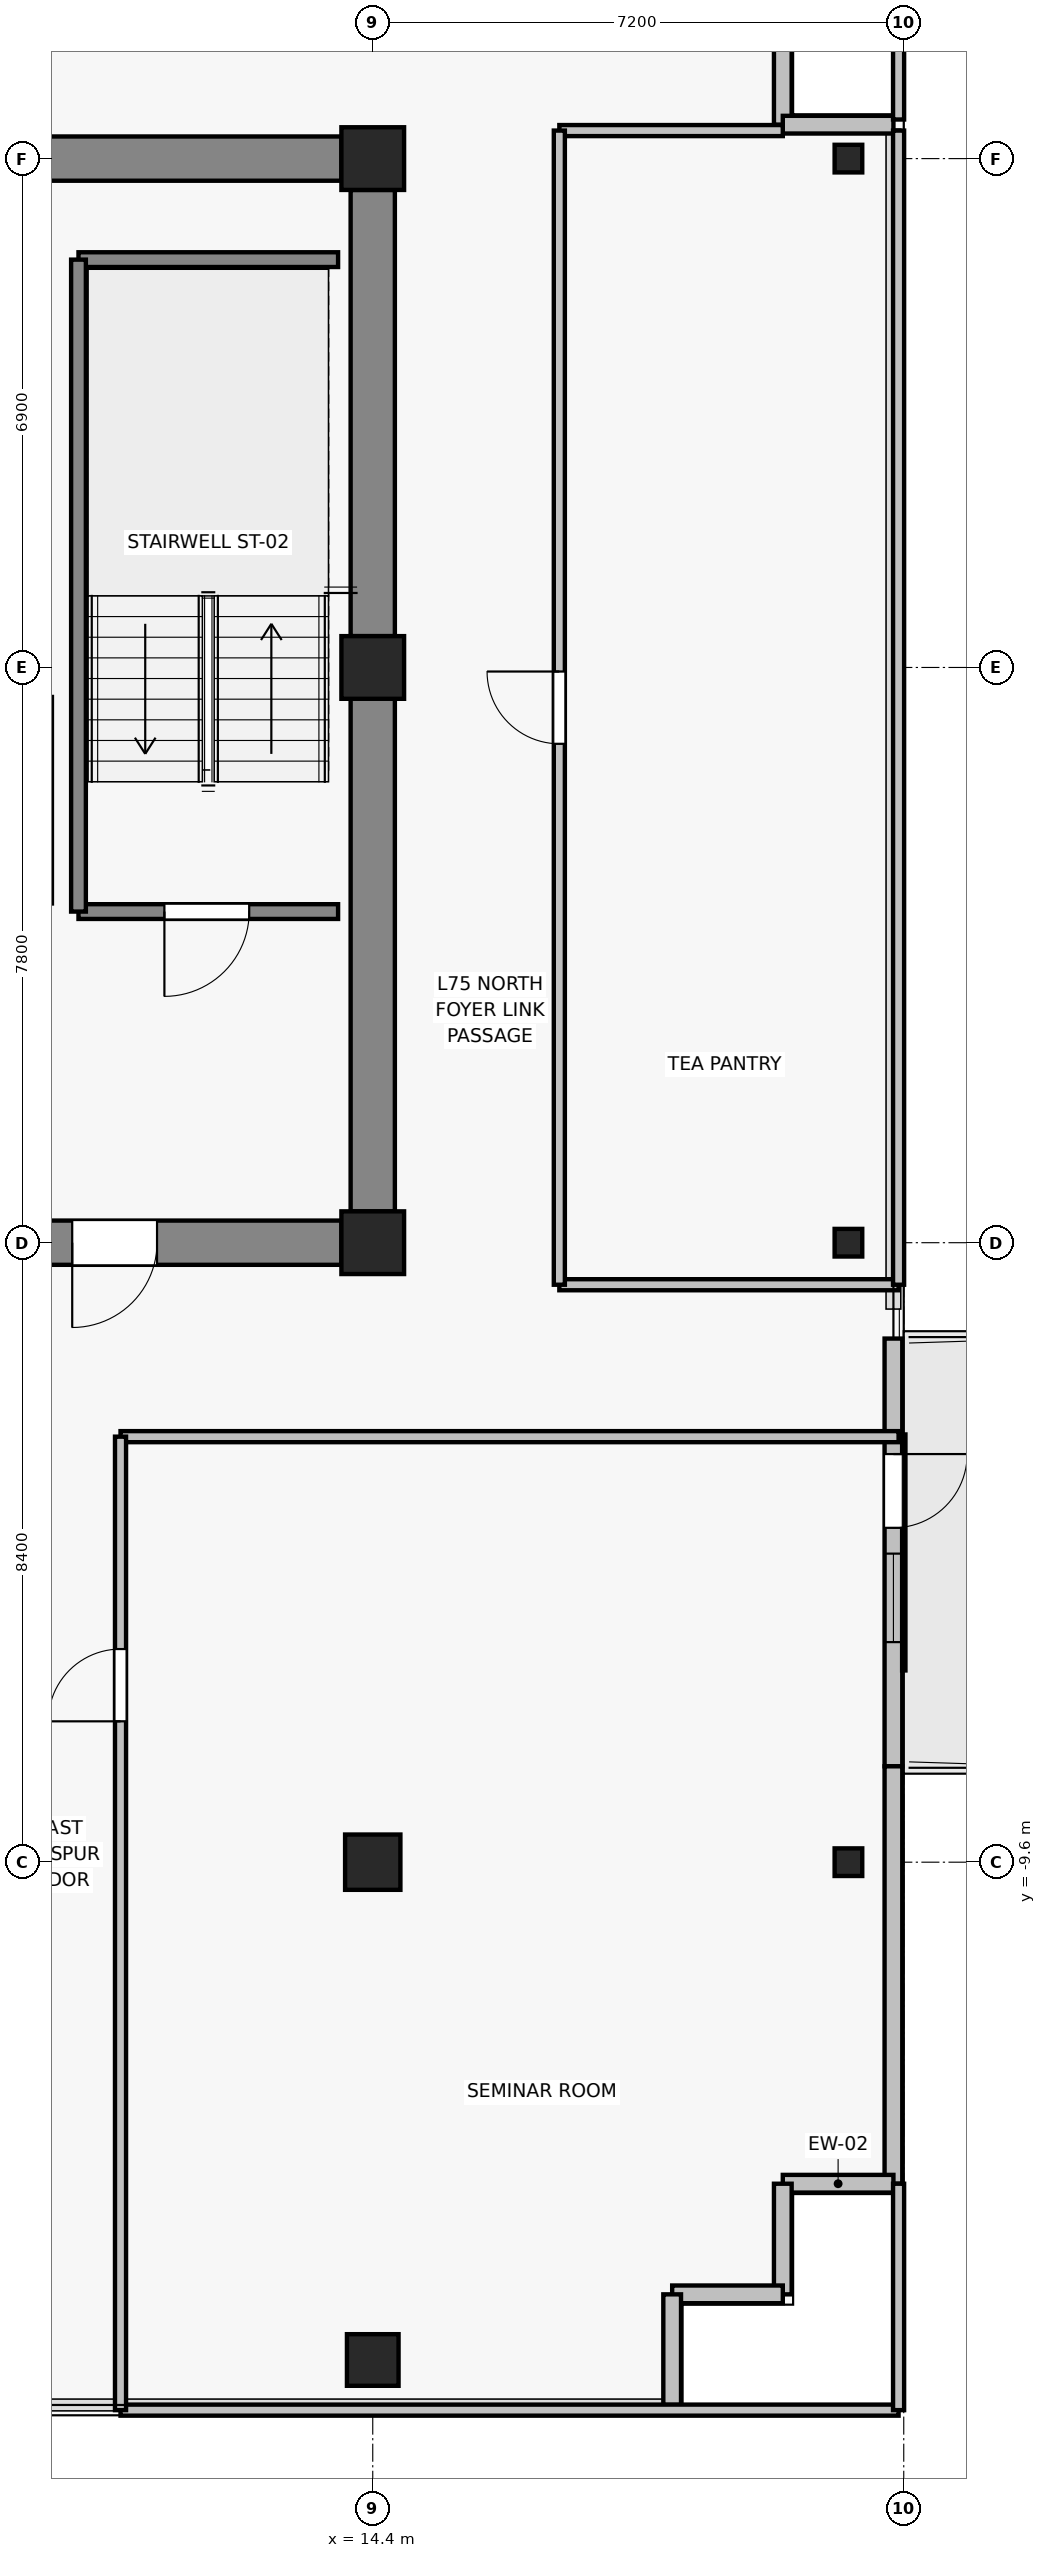
"""IFC4 building model, lengths in metres.
Left out: names, types, materials, properties, quantities, classifications, styles, units other than length and angle.
Written with IfcOpenShell. Run it as: python <this file> out.ifc"""

import sys

from ifc_helpers import new_model, si_unit, direction, frame, frame_2d, origin, origin_2d, place, context, subcontext, project, spatial, rectangle, i_section, extrude, source, transform, mapped, element, fill, save


model = new_model("IFC4")
c1 = context("Model", 3, precision=1e-05, world=origin(), true_north=direction((0.0, 1.0)))
c2 = subcontext(c1, "Body", "Model", "MODEL_VIEW")
j1 = project(units=[si_unit("LENGTHUNIT", "METRE"), si_unit("PLANEANGLEUNIT", "RADIAN")], contexts=[c1])
p1 = place(None, origin())
s1 = spatial("IfcSite", under=j1, at=p1, CompositionType="ELEMENT")
p2 = place(p1, origin())
s2 = spatial("IfcBuilding", under=s1, at=p2, CompositionType="ELEMENT")
p3 = place(p2, frame((0.0, 0.0, 265.0)))
s3 = spatial("IfcBuildingStorey", under=s2, at=p3, CompositionType="ELEMENT", Elevation=265.0)
for number, where, z_axis, x_axis in (
    (1, (14.4, -1.2, 0.0), (0.0, 0.0, 1.0), (1.0, 0.0, 0.0)),
    (2, (14.4, 6.6, 0.0), (0.0, 0.0, 1.0), (1.0, 0.0, 0.0)),
    (3, (14.4, 13.5, 0.0), (0.0, 0.0, 1.0), (1.0, 0.0, 0.0)),
):
    element("IfcColumn", number, at=place(p3, frame(where, z_axis=z_axis, x_axis=x_axis)), inside=s3, PredefinedType="COLUMN", context=c2, shape_type="SweptSolid", body=[
        extrude(rectangle(XDim=0.85, YDim=0.85, at=origin_2d()), origin(), (0.0, 0.0, 1.0), 3.3),
    ])
p4 = place(p3, frame((14.4, -9.6, 0.0), z_axis=(0.0, 0.0, 1.0), x_axis=(1.0, 0.0, 0.0)))
e4 = element("IfcColumn", 4, at=p4, inside=s3, PredefinedType="COLUMN", context=c2, shape_type="SweptSolid", body=[
    extrude(rectangle(XDim=0.75, YDim=0.75, at=origin_2d()), origin(), (0.0, 0.0, 1.0), 3.3),
])
p5 = place(p3, frame((14.4, -16.35, 0.0), z_axis=(0.0, 0.0, 1.0), x_axis=(1.0, 0.0, 0.0)))
e5 = element("IfcColumn", 5, at=p5, inside=s3, PredefinedType="COLUMN", context=c2, shape_type="SweptSolid", body=[
    extrude(rectangle(XDim=0.7, YDim=0.7, at=origin_2d()), origin(), (0.0, 0.0, 1.0), 3.3),
])
for number, where, z_axis, x_axis in (
    (6, (20.85, -9.6, 0.0), (0.0, 0.0, 1.0), (1.0, 0.0, 0.0)),
    (7, (20.85, -1.2, 0.0), (0.0, 0.0, 1.0), (1.0, 0.0, 0.0)),
    (8, (20.85, 13.5, 0.0), (0.0, 0.0, 1.0), (1.0, 0.0, 0.0)),
):
    element("IfcColumn", number, at=place(p3, frame(where, z_axis=z_axis, x_axis=x_axis)), inside=s3, PredefinedType="COLUMN", context=c2, shape_type="SweptSolid", body=[
        extrude(i_section(OverallWidth=0.375, OverallDepth=0.375, WebThickness=0.017, FlangeThickness=0.027, FilletRadius=0.015, at=origin_2d()), origin(), (0.0, 0.0, 1.0), 3.3),
    ])
p6 = place(p3, frame((7.625, 13.5, 0.0), z_axis=(0.0, 0.0, 1.0), x_axis=(1.0, 0.0, 0.0)))
e9 = element("IfcWall", 9, at=p6, inside=s3, PredefinedType="SHEAR", context=c2, shape_type="SweptSolid", body=[
    extrude(rectangle(XDim=6.35, YDim=0.6, at=frame_2d((3.175, 0.0))), origin(), (0.0, 0.0, 1.0), 3.075),
])
p7 = place(p3, frame((14.4, -0.775, 0.0), z_axis=(0.0, 0.0, 1.0), x_axis=(0.0, 1.0, 0.0)))
e10 = element("IfcWall", 10, at=p7, inside=s3, PredefinedType="SHEAR", context=c2, shape_type="SweptSolid", body=[
    extrude(rectangle(XDim=6.95, YDim=0.6, at=frame_2d((3.475, 0.0))), origin(), (0.0, 0.0, 1.0), 3.075),
])
p8 = place(p3, frame((14.4, 7.025, 0.0), z_axis=(0.0, 0.0, 1.0), x_axis=(0.0, 1.0, 0.0)))
e11 = element("IfcWall", 11, at=p8, inside=s3, PredefinedType="SHEAR", context=c2, shape_type="SweptSolid", body=[
    extrude(rectangle(XDim=6.05, YDim=0.6, at=frame_2d((3.025, 0.0))), origin(), (0.0, 0.0, 1.0), 3.075),
])
p9 = place(p3, frame((13.975, -1.2, 0.0), z_axis=(0.0, 0.0, 1.0), x_axis=(-1.0, 0.0, 0.0)))
e12 = element("IfcWall", 12, at=p9, inside=s3, PredefinedType="SHEAR", context=c2, shape_type="SweptSolid", body=[
    extrude(rectangle(XDim=6.35, YDim=0.6, at=frame_2d((3.175, 0.0))), origin(), (0.0, 0.0, 1.0), 3.075),
])
p10 = place(p9, frame((2.5, 0.0, 0.0)))
e13 = element("IfcOpeningElement", 13, at=p10, cuts=e12, PredefinedType="OPENING", context=c2, shape_type="SweptSolid", body=[
    extrude(rectangle(XDim=1.15, YDim=2.15, at=frame_2d((0.575, 1.075))), frame((0.0, 0.31, 0.0), z_axis=(0.0, -1.0, 0.0), x_axis=(1.0, 0.0, 0.0)), (0.0, 0.0, 1.0), 0.62),
])
p11 = place(p3, frame((21.46, -2.5, 0.0), z_axis=(0.0, 0.0, 1.0), x_axis=(0.0, -1.0, 0.0)))
e14 = element("IfcWall", 14, at=p11, inside=s3, PredefinedType="SOLIDWALL", context=c2, shape_type="SweptSolid", body=[
    extrude(rectangle(XDim=5.8, YDim=0.24, at=frame_2d((2.9, 0.0))), origin(), (0.0, 0.0, 1.0), 3.075),
])
p12 = place(p11, frame((1.566, 0.0, 0.0)))
e15 = element("IfcOpeningElement", 15, at=p12, cuts=e14, PredefinedType="OPENING", context=c2, shape_type="SweptSolid", body=[
    extrude(rectangle(XDim=1.0, YDim=2.2, at=frame_2d((0.5, 1.1))), frame((0.0, 0.13, 0.0), z_axis=(0.0, -1.0, 0.0), x_axis=(1.0, 0.0, 0.0)), (0.0, 0.0, 1.0), 0.26),
])
p13 = place(p11, frame((2.916, 0.0, 0.85)))
e16 = element("IfcOpeningElement", 16, at=p13, cuts=e14, PredefinedType="OPENING", context=c2, shape_type="SweptSolid", body=[
    extrude(rectangle(XDim=1.2, YDim=1.5, at=frame_2d((0.6, 0.75))), frame((0.0, 0.13, 0.0), z_axis=(0.0, -1.0, 0.0), x_axis=(1.0, 0.0, 0.0)), (0.0, 0.0, 1.0), 0.26),
])
for number, where, z_axis, x_axis in (
    (17, (19.96, 13.96, 0.0), (0.0, 0.0, 1.0), (0.0, 1.0, 0.0)),
    (18, (21.46, 13.96, 0.0), (0.0, 0.0, 1.0), (-1.0, 0.0, 0.0)),
):
    element("IfcWall", number, at=place(p3, frame(where, z_axis=z_axis, x_axis=x_axis)), inside=s3, PredefinedType="SOLIDWALL", context=c2, shape_type="SweptSolid", body=[
        extrude(rectangle(XDim=1.5, YDim=0.24, at=frame_2d((0.75, 0.0))), origin(), (0.0, 0.0, 1.0), 3.075),
    ])
p14 = place(p3, frame((21.46, -13.96, 0.0), z_axis=(0.0, 0.0, 1.0), x_axis=(0.0, 1.0, 0.0)))
e19 = element("IfcWall", 19, at=p14, inside=s3, PredefinedType="SOLIDWALL", context=c2, shape_type="SweptSolid", body=[
    extrude(rectangle(XDim=5.66, YDim=0.24, at=frame_2d((2.83, 0.0))), origin(), (0.0, 0.0, 1.0), 3.075),
])
for number, where, z_axis, x_axis in (
    (20, (19.96, -13.96, 0.0), (0.0, 0.0, 1.0), (1.0, 0.0, 0.0)),
    (21, (19.96, -15.46, 0.0), (0.0, 0.0, 1.0), (0.0, 1.0, 0.0)),
    (22, (18.46, -15.46, 0.0), (0.0, 0.0, 1.0), (1.0, 0.0, 0.0)),
    (23, (18.46, -16.96, 0.0), (0.0, 0.0, 1.0), (0.0, 1.0, 0.0)),
):
    element("IfcWall", number, at=place(p3, frame(where, z_axis=z_axis, x_axis=x_axis)), inside=s3, PredefinedType="SOLIDWALL", context=c2, shape_type="SweptSolid", body=[
        extrude(rectangle(XDim=1.5, YDim=0.24, at=frame_2d((0.75, 0.0))), origin(), (0.0, 0.0, 1.0), 3.075),
    ])
p15 = place(p3, frame((13.93, 3.29, 0.0), z_axis=(0.0, 0.0, 1.0), x_axis=(-1.0, 0.0, 0.0)))
e24 = element("IfcWall", 24, at=p15, inside=s3, PredefinedType="SOLIDWALL", context=c2, shape_type="SweptSolid", body=[
    extrude(rectangle(XDim=3.52, YDim=0.2, at=frame_2d((1.76, 0.0))), origin(), (0.0, 0.0, 1.0), 3.075),
])
p16 = place(p15, frame((1.205, 0.0, 0.0)))
e25 = element("IfcOpeningElement", 25, at=p16, cuts=e24, PredefinedType="OPENING", context=c2, shape_type="SweptSolid", body=[
    extrude(rectangle(XDim=1.15, YDim=2.15, at=frame_2d((0.575, 1.075))), frame((0.0, 0.11, 0.0), z_axis=(0.0, -1.0, 0.0), x_axis=(1.0, 0.0, 0.0)), (0.0, 0.0, 1.0), 0.22),
])
p17 = place(p3, frame((10.41, 12.13, 0.0), z_axis=(0.0, 0.0, 1.0), x_axis=(1.0, 0.0, 0.0)))
e26 = element("IfcWall", 26, at=p17, inside=s3, PredefinedType="SOLIDWALL", context=c2, shape_type="SweptSolid", body=[
    extrude(rectangle(XDim=3.52, YDim=0.2, at=frame_2d((1.76, 0.0))), origin(), (0.0, 0.0, 1.0), 3.075),
])
p18 = place(p3, frame((10.41, 3.29, 0.0), z_axis=(0.0, 0.0, 1.0), x_axis=(0.0, 1.0, 0.0)))
e27 = element("IfcWall", 27, at=p18, inside=s3, PredefinedType="SOLIDWALL", context=c2, shape_type="SweptSolid", body=[
    extrude(rectangle(XDim=8.84, YDim=0.2, at=frame_2d((4.42, 0.0))), origin(), (0.0, 0.0, 1.0), 3.075),
])
p19 = place(p3, frame((21.53, -17.03, 0.0), z_axis=(0.0, 0.0, 1.0), x_axis=(-1.0, 0.0, 0.0)))
e28 = element("IfcWall", 28, at=p19, inside=s3, PredefinedType="PARTITIONING", context=c2, shape_type="SweptSolid", body=[
    extrude(rectangle(XDim=10.55, YDim=0.15, at=frame_2d((5.275, 0.0))), origin(), (0.0, 0.0, 1.0), 3.075),
])
p20 = place(p3, frame((10.98, -3.83, 0.0), z_axis=(0.0, 0.0, 1.0), x_axis=(1.0, 0.0, 0.0)))
e29 = element("IfcWall", 29, at=p20, inside=s3, PredefinedType="PARTITIONING", context=c2, shape_type="SweptSolid", body=[
    extrude(rectangle(XDim=10.55, YDim=0.15, at=frame_2d((5.275, 0.0))), origin(), (0.0, 0.0, 1.0), 2.615),
])
p21 = place(p3, frame((10.98, -17.03, 0.0), z_axis=(0.0, 0.0, 1.0), x_axis=(0.0, 1.0, 0.0)))
e30 = element("IfcWall", 30, at=p21, inside=s3, PredefinedType="PARTITIONING", context=c2, shape_type="SweptSolid", body=[
    extrude(rectangle(XDim=13.2, YDim=0.15, at=frame_2d((6.6, 0.0))), origin(), (0.0, 0.0, 1.0), 2.615),
])
p22 = place(p21, frame((9.34, 0.0, 0.0)))
e31 = element("IfcOpeningElement", 31, at=p22, cuts=e30, PredefinedType="OPENING", context=c2, shape_type="SweptSolid", body=[
    extrude(rectangle(XDim=0.98, YDim=2.15, at=frame_2d((0.49, 1.075))), frame((0.0, 0.085, 0.0), z_axis=(0.0, -1.0, 0.0), x_axis=(1.0, 0.0, 0.0)), (0.0, 0.0, 1.0), 0.17),
])
p23 = place(p3, frame((21.53, -13.96, 0.0), z_axis=(0.0, 0.0, 1.0), x_axis=(0.0, -1.0, 0.0)))
e32 = element("IfcWall", 32, at=p23, inside=s3, PredefinedType="PARTITIONING", context=c2, shape_type="SweptSolid", body=[
    extrude(rectangle(XDim=3.07, YDim=0.15, at=frame_2d((1.535, 0.0))), origin(), (0.0, 0.0, 1.0), 3.075),
])
p24 = place(p3, frame((21.53, -1.77, 0.0), z_axis=(0.0, 0.0, 1.0), x_axis=(-1.0, 0.0, 0.0)))
e33 = element("IfcWall", 33, at=p24, inside=s3, PredefinedType="PARTITIONING", context=c2, shape_type="SweptSolid", body=[
    extrude(rectangle(XDim=4.6, YDim=0.15, at=frame_2d((2.3, 0.0))), origin(), (0.0, 0.0, 1.0), 2.765),
])
p25 = place(p3, frame((16.93, 13.88, 0.0), z_axis=(0.0, 0.0, 1.0), x_axis=(1.0, 0.0, 0.0)))
e34 = element("IfcWall", 34, at=p25, inside=s3, PredefinedType="PARTITIONING", context=c2, shape_type="SweptSolid", body=[
    extrude(rectangle(XDim=3.03, YDim=0.15, at=frame_2d((1.515, 0.0))), origin(), (0.0, 0.0, 1.0), 3.075),
])
p26 = place(p3, frame((16.93, -1.77, 0.0), z_axis=(0.0, 0.0, 1.0), x_axis=(0.0, 1.0, 0.0)))
e35 = element("IfcWall", 35, at=p26, inside=s3, PredefinedType="PARTITIONING", context=c2, shape_type="SweptSolid", body=[
    extrude(rectangle(XDim=15.65, YDim=0.15, at=frame_2d((7.825, 0.0))), origin(), (0.0, 0.0, 1.0), 2.615),
])
p27 = place(p26, frame((7.335, 0.0, 0.0)))
e36 = element("IfcOpeningElement", 36, at=p27, cuts=e35, PredefinedType="OPENING", context=c2, shape_type="SweptSolid", body=[
    extrude(rectangle(XDim=0.98, YDim=2.15, at=frame_2d((0.49, 1.075))), frame((0.0, 0.085, 0.0), z_axis=(0.0, -1.0, 0.0), x_axis=(1.0, 0.0, 0.0)), (0.0, 0.0, 1.0), 0.17),
])
p28 = place(p3, frame((21.53, 13.88, 0.0), z_axis=(0.0, 0.0, 1.0), x_axis=(0.0, -1.0, 0.0)))
e37 = element("IfcWall", 37, at=p28, inside=s3, PredefinedType="PARTITIONING", context=c2, shape_type="SweptSolid", body=[
    extrude(rectangle(XDim=15.65, YDim=0.15, at=frame_2d((7.825, 0.0))), origin(), (0.0, 0.0, 1.0), 3.075),
])
p29 = place(p3, frame((21.53, 17.03, 0.0), z_axis=(0.0, 0.0, 1.0), x_axis=(0.0, -1.0, 0.0)))
e38 = element("IfcWall", 38, at=p29, inside=s3, PredefinedType="PARTITIONING", context=c2, shape_type="SweptSolid", body=[
    extrude(rectangle(XDim=3.0, YDim=0.15, at=frame_2d((1.5, 0.0))), origin(), (0.0, 0.0, 1.0), 3.075),
])
m1 = source(origin(), c2, "Body", "SweptSolid", [
    extrude(rectangle(XDim=1.0, YDim=2.2, at=frame_2d((0.5, 1.1))), frame((0.0, 0.025, 0.0), z_axis=(0.0, -1.0, 0.0), x_axis=(1.0, 0.0, 0.0)), (0.0, 0.0, 1.0), 0.05),
])
p30 = place(p12, origin())
e39 = element("IfcDoor", 39, at=p30, inside=s3, OperationType="SINGLE_SWING_LEFT", PredefinedType="DOOR", context=c2, shape_type="MappedRepresentation", body=[
    mapped(m1, transform((0.0, 0.0, 0.0), x_axis=(1.0, 0.0, 0.0), y_axis=(0.0, 1.0, 0.0), z_axis=(0.0, 0.0, 1.0), scale=1.0)),
])
fill(e15, e39)
m2 = source(origin(), c2, "Body", "SweptSolid", [
    extrude(rectangle(XDim=1.2, YDim=1.5, at=frame_2d((0.6, 0.75))), frame((0.0, 0.03, 0.0), z_axis=(0.0, -1.0, 0.0), x_axis=(1.0, 0.0, 0.0)), (0.0, 0.0, 1.0), 0.06),
])
p31 = place(p13, origin())
e40 = element("IfcWindow", 40, at=p31, inside=s3, PartitioningType="SINGLE_PANEL", PredefinedType="WINDOW", context=c2, shape_type="MappedRepresentation", body=[
    mapped(m2, transform((0.0, 0.0, 0.0), x_axis=(1.0, 0.0, 0.0), y_axis=(0.0, 1.0, 0.0), z_axis=(0.0, 0.0, 1.0), scale=1.0)),
])
fill(e16, e40)
m3 = source(origin(), c2, "Body", "SweptSolid", [
    extrude(rectangle(XDim=1.15, YDim=2.15, at=frame_2d((0.575, 1.075))), frame((0.0, 0.025, 0.0), z_axis=(0.0, -1.0, 0.0), x_axis=(1.0, 0.0, 0.0)), (0.0, 0.0, 1.0), 0.05),
])
p32 = place(p16, origin())
e41 = element("IfcDoor", 41, at=p32, inside=s3, OperationType="SINGLE_SWING_RIGHT", PredefinedType="DOOR", context=c2, shape_type="MappedRepresentation", body=[
    mapped(m3, transform((0.0, 0.0, 0.0), x_axis=(1.0, 0.0, 0.0), y_axis=(0.0, 1.0, 0.0), z_axis=(0.0, 0.0, 1.0), scale=1.0)),
])
fill(e25, e41)
p33 = place(p10, origin())
e42 = element("IfcDoor", 42, at=p33, inside=s3, OperationType="SINGLE_SWING_RIGHT", PredefinedType="DOOR", context=c2, shape_type="MappedRepresentation", body=[
    mapped(m3, transform((0.0, 0.0, 0.0), x_axis=(1.0, 0.0, 0.0), y_axis=(0.0, 1.0, 0.0), z_axis=(0.0, 0.0, 1.0), scale=1.0)),
])
fill(e13, e42)
m4 = source(origin(), c2, "Body", "SweptSolid", [
    extrude(rectangle(XDim=0.98, YDim=2.15, at=frame_2d((0.49, 1.075))), frame((0.0, 0.025, 0.0), z_axis=(0.0, -1.0, 0.0), x_axis=(1.0, 0.0, 0.0)), (0.0, 0.0, 1.0), 0.05),
])
p34 = place(p22, origin())
e43 = element("IfcDoor", 43, at=p34, inside=s3, OperationType="SINGLE_SWING_LEFT", PredefinedType="DOOR", context=c2, shape_type="MappedRepresentation", body=[
    mapped(m4, transform((0.0, 0.0, 0.0), x_axis=(1.0, 0.0, 0.0), y_axis=(0.0, 1.0, 0.0), z_axis=(0.0, 0.0, 1.0), scale=1.0)),
])
fill(e31, e43)
p35 = place(p27, origin())
e44 = element("IfcDoor", 44, at=p35, inside=s3, OperationType="SINGLE_SWING_RIGHT", PredefinedType="DOOR", context=c2, shape_type="MappedRepresentation", body=[
    mapped(m4, transform((0.0, 0.0, 0.0), x_axis=(1.0, 0.0, 0.0), y_axis=(0.0, 1.0, 0.0), z_axis=(0.0, 0.0, 1.0), scale=1.0)),
])
fill(e36, e44)
save(model, sys.argv[1])
